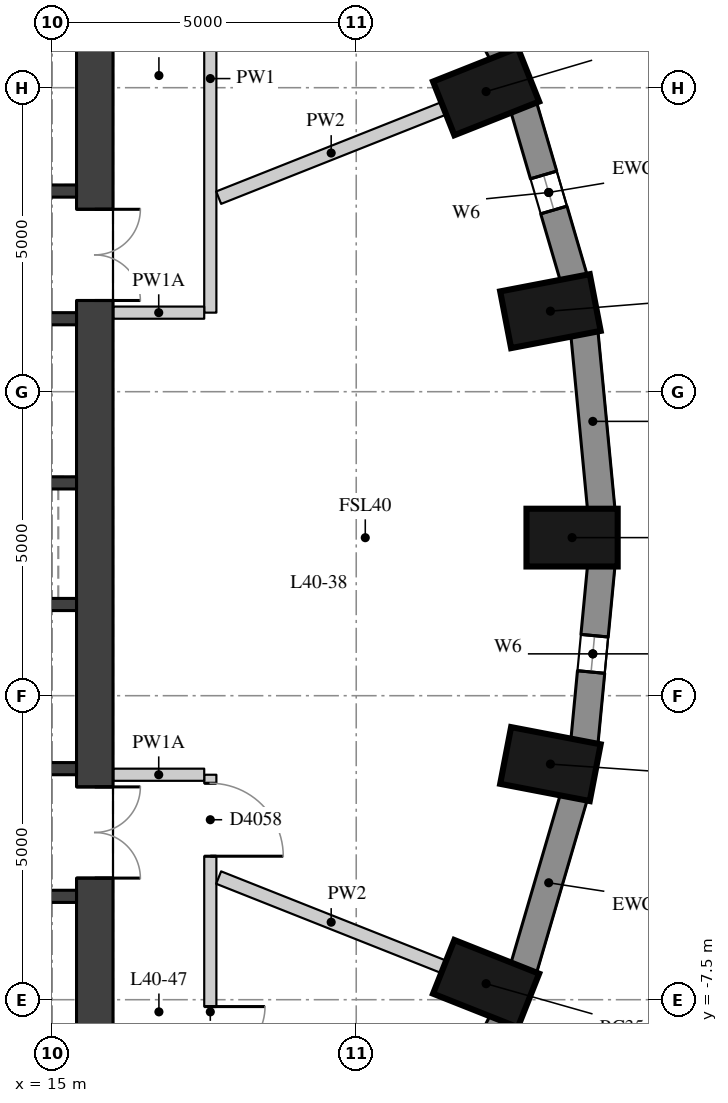
"""IFC4 building model, lengths in metres.
Left out: names, types, materials, properties, quantities, classifications, styles, units other than length and angle.
Written with IfcOpenShell. Run it as: python <this file> out.ifc"""

import sys

from ifc_helpers import new_model, si_unit, direction, frame, frame_2d, origin, origin_2d, place, context, subcontext, project, spatial, rectangle, extrude, element, fill, save


model = new_model("IFC4")
c1 = context("Model", 3, precision=1e-05, world=origin(), true_north=direction((0.0, 1.0)))
c2 = subcontext(c1, "Body", "Model", "MODEL_VIEW")
j1 = project(units=[si_unit("LENGTHUNIT", "METRE"), si_unit("PLANEANGLEUNIT", "RADIAN")], contexts=[c1])
p1 = place(None, origin())
s1 = spatial("IfcSite", under=j1, at=p1, CompositionType="ELEMENT")
p2 = place(p1, origin())
s2 = spatial("IfcBuilding", under=s1, at=p2, CompositionType="ELEMENT")
p3 = place(p2, frame((0.0, 0.0, 145.1)))
s3 = spatial("IfcBuildingStorey", under=s2, at=p3, CompositionType="ELEMENT", Elevation=145.1)
for number, where, z_axis, x_axis in (
    (1, (23.55, 0.1, 0.0), (0.0, 0.0, 1.0), (1.0, 0.0, 0.0)),
    (2, (23.194, 3.825, 0.0), (0.0, 0.0, 1.0), (0.982, 0.189, 0.0)),
    (3, (22.136, 7.436, 0.0), (0.0, 0.0, 1.0), (0.93, 0.369, 0.0)),
    (4, (22.136, -7.236, 0.0), (0.0, 0.0, 1.0), (0.93, -0.369, 0.0)),
    (5, (23.194, -3.625, 0.0), (0.0, 0.0, 1.0), (0.982, -0.189, 0.0)),
):
    element("IfcColumn", number, at=place(p3, frame(where, z_axis=z_axis, x_axis=x_axis)), inside=s3, PredefinedType="COLUMN", context=c2, shape_type="SweptSolid", body=[
        extrude(rectangle(XDim=1.5, YDim=0.95, at=origin_2d()), origin(), (0.0, 0.0, 1.0), 3.3),
    ])
p4 = place(p3, frame((24.031, 0.555, 0.0), z_axis=(0.0, 0.0, 1.0), x_axis=(-0.095265737322, 0.995451876935, 0.0)))
e6 = element("IfcWall", 6, at=p4, inside=s3, PredefinedType="SOLIDWALL", context=c2, shape_type="SweptSolid", body=[
    extrude(rectangle(XDim=2.927, YDim=0.45, at=frame_2d((1.463, 0.0))), origin(), (0.0, 0.0, 1.0), 3.02),
])
p5 = place(p3, frame((23.58, 4.362, 0.0), z_axis=(0.0, 0.0, 1.0), x_axis=(-0.281049481624, 0.959693278542, 0.0)))
e7 = element("IfcWall", 7, at=p5, inside=s3, PredefinedType="SOLIDWALL", context=c2, shape_type="SweptSolid", body=[
    extrude(rectangle(XDim=2.948, YDim=0.45, at=frame_2d((1.474, 0.0))), origin(), (0.0, 0.0, 1.0), 3.02),
])
p6 = place(p5, frame((1.174, 0.0, 0.4)))
e8 = element("IfcOpeningElement", 8, at=p6, cuts=e7, PredefinedType="OPENING", context=c2, shape_type="SweptSolid", body=[
    extrude(rectangle(XDim=0.6, YDim=1.75, at=frame_2d((0.3, 0.875))), frame((0.0, 0.235, 0.0), z_axis=(0.0, -1.0, 0.0), x_axis=(1.0, 0.0, 0.0)), (0.0, 0.0, 1.0), 0.47),
])
p7 = place(p3, frame((22.415, 8.037, 0.0), z_axis=(0.0, 0.0, 1.0), x_axis=(-0.454133999889, 0.890933392653, 0.0)))
e9 = element("IfcWall", 9, at=p7, inside=s3, PredefinedType="SOLIDWALL", context=c2, shape_type="SweptSolid", body=[
    extrude(rectangle(XDim=2.986, YDim=0.45, at=frame_2d((1.493, 0.0))), origin(), (0.0, 0.0, 1.0), 3.02),
])
p8 = place(p3, frame((21.059, -10.497, 0.0), z_axis=(0.0, 0.0, 1.0), x_axis=(0.454133999889, 0.890933392653, 0.0)))
e10 = element("IfcWall", 10, at=p8, inside=s3, PredefinedType="SOLIDWALL", context=c2, shape_type="SweptSolid", body=[
    extrude(rectangle(XDim=2.986, YDim=0.45, at=frame_2d((1.493, 0.0))), origin(), (0.0, 0.0, 1.0), 3.02),
])
p9 = place(p8, frame((1.193, 0.0, 0.4)))
e11 = element("IfcOpeningElement", 11, at=p9, cuts=e10, PredefinedType="OPENING", context=c2, shape_type="SweptSolid", body=[
    extrude(rectangle(XDim=0.6, YDim=1.75, at=frame_2d((0.3, 0.875))), frame((0.0, 0.235, 0.0), z_axis=(0.0, -1.0, 0.0), x_axis=(1.0, 0.0, 0.0)), (0.0, 0.0, 1.0), 0.47),
])
p10 = place(p3, frame((22.751, -6.991, 0.0), z_axis=(0.0, 0.0, 1.0), x_axis=(0.281049481624, 0.959693278542, 0.0)))
e12 = element("IfcWall", 12, at=p10, inside=s3, PredefinedType="SOLIDWALL", context=c2, shape_type="SweptSolid", body=[
    extrude(rectangle(XDim=2.948, YDim=0.45, at=frame_2d((1.474, 0.0))), origin(), (0.0, 0.0, 1.0), 3.02),
])
p11 = place(p3, frame((23.752, -3.269, 0.0), z_axis=(0.0, 0.0, 1.0), x_axis=(0.095257827044, 0.995452633924, 0.0)))
e13 = element("IfcWall", 13, at=p11, inside=s3, PredefinedType="SOLIDWALL", context=c2, shape_type="SweptSolid", body=[
    extrude(rectangle(XDim=2.927, YDim=0.45, at=frame_2d((1.463, 0.0))), origin(), (0.0, 0.0, 1.0), 3.02),
])
p12 = place(p11, frame((1.163, 0.0, 0.4)))
e14 = element("IfcOpeningElement", 14, at=p12, cuts=e13, PredefinedType="OPENING", context=c2, shape_type="SweptSolid", body=[
    extrude(rectangle(XDim=0.6, YDim=1.75, at=frame_2d((0.3, 0.875))), frame((0.0, 0.235, 0.0), z_axis=(0.0, -1.0, 0.0), x_axis=(1.0, 0.0, 0.0)), (0.0, 0.0, 1.0), 0.47),
])
p13 = place(p3, frame((15.7, -9.4, 0.0), z_axis=(0.0, 0.0, 1.0), x_axis=(0.0, 1.0, 0.0)))
e15 = element("IfcWall", 15, at=p13, inside=s3, PredefinedType="SHEAR", context=c2, shape_type="SweptSolid", body=[
    extrude(rectangle(XDim=18.8, YDim=0.6, at=frame_2d((9.4, 0.0))), origin(), (0.0, 0.0, 1.0), 3.02),
])
p14 = place(p13, frame((13.4, 0.0, 0.0)))
e16 = element("IfcOpeningElement", 16, at=p14, cuts=e15, PredefinedType="OPENING", context=c2, shape_type="SweptSolid", body=[
    extrude(rectangle(XDim=1.5, YDim=2.1, at=frame_2d((0.75, 1.05))), frame((0.0, 0.31, 0.0), z_axis=(0.0, -1.0, 0.0), x_axis=(1.0, 0.0, 0.0)), (0.0, 0.0, 1.0), 0.62),
])
p15 = place(p13, frame((3.9, 0.0, 0.0)))
e17 = element("IfcOpeningElement", 17, at=p15, cuts=e15, PredefinedType="OPENING", context=c2, shape_type="SweptSolid", body=[
    extrude(rectangle(XDim=1.5, YDim=2.1, at=frame_2d((0.75, 1.05))), frame((0.0, 0.31, 0.0), z_axis=(0.0, -1.0, 0.0), x_axis=(1.0, 0.0, 0.0)), (0.0, 0.0, 1.0), 0.62),
])
p16 = place(p3, frame((4.6, 5.8, 0.0), z_axis=(0.0, 0.0, 1.0), x_axis=(1.0, 0.0, 0.0)))
e18 = element("IfcWall", 18, at=p16, inside=s3, PredefinedType="SHEAR", context=c2, shape_type="SweptSolid", body=[
    extrude(rectangle(XDim=10.8, YDim=0.2, at=frame_2d((5.4, 0.0))), origin(), (0.0, 0.0, 1.0), 3.02),
])
p17 = place(p16, frame((7.05, 0.0, 0.0)))
e19 = element("IfcOpeningElement", 19, at=p17, cuts=e18, PredefinedType="OPENING", context=c2, shape_type="SweptSolid", body=[
    extrude(rectangle(XDim=1.1, YDim=2.1, at=frame_2d((0.55, 1.05))), frame((0.0, 0.11, 0.0), z_axis=(0.0, -1.0, 0.0), x_axis=(1.0, 0.0, 0.0)), (0.0, 0.0, 1.0), 0.22),
])
p18 = place(p16, frame((9.05, 0.0, 0.0)))
e20 = element("IfcOpeningElement", 20, at=p18, cuts=e18, PredefinedType="OPENING", context=c2, shape_type="SweptSolid", body=[
    extrude(rectangle(XDim=1.1, YDim=2.1, at=frame_2d((0.55, 1.05))), frame((0.0, 0.11, 0.0), z_axis=(0.0, -1.0, 0.0), x_axis=(1.0, 0.0, 0.0)), (0.0, 0.0, 1.0), 0.22),
])
p19 = place(p3, frame((4.6, 3.7, 0.0), z_axis=(0.0, 0.0, 1.0), x_axis=(1.0, 0.0, 0.0)))
e21 = element("IfcWall", 21, at=p19, inside=s3, PredefinedType="SHEAR", context=c2, shape_type="SweptSolid", body=[
    extrude(rectangle(XDim=10.8, YDim=0.2, at=frame_2d((5.4, 0.0))), origin(), (0.0, 0.0, 1.0), 3.02),
])
p20 = place(p19, frame((6.6, 0.0, 0.0)))
e22 = element("IfcOpeningElement", 22, at=p20, cuts=e21, PredefinedType="OPENING", context=c2, shape_type="SweptSolid", body=[
    extrude(rectangle(XDim=1.1, YDim=2.1, at=frame_2d((0.55, 1.05))), frame((0.0, 0.11, 0.0), z_axis=(0.0, -1.0, 0.0), x_axis=(1.0, 0.0, 0.0)), (0.0, 0.0, 1.0), 0.22),
])
p21 = place(p19, frame((8.9, 0.0, 0.0)))
e23 = element("IfcOpeningElement", 23, at=p21, cuts=e21, PredefinedType="OPENING", context=c2, shape_type="SweptSolid", body=[
    extrude(rectangle(XDim=1.1, YDim=2.1, at=frame_2d((0.55, 1.05))), frame((0.0, 0.11, 0.0), z_axis=(0.0, -1.0, 0.0), x_axis=(1.0, 0.0, 0.0)), (0.0, 0.0, 1.0), 0.22),
])
for number, where, z_axis, x_axis in (
    (24, (4.6, 1.0, 0.0), (0.0, 0.0, 1.0), (1.0, 0.0, 0.0)),
    (25, (4.6, -1.0, 0.0), (0.0, 0.0, 1.0), (1.0, 0.0, 0.0)),
):
    element("IfcWall", number, at=place(p3, frame(where, z_axis=z_axis, x_axis=x_axis)), inside=s3, PredefinedType="SHEAR", context=c2, shape_type="SweptSolid", body=[
        extrude(rectangle(XDim=10.8, YDim=0.2, at=frame_2d((5.4, 0.0))), origin(), (0.0, 0.0, 1.0), 3.02),
    ])
p22 = place(p3, frame((4.6, -3.7, 0.0), z_axis=(0.0, 0.0, 1.0), x_axis=(1.0, 0.0, 0.0)))
e26 = element("IfcWall", 26, at=p22, inside=s3, PredefinedType="SHEAR", context=c2, shape_type="SweptSolid", body=[
    extrude(rectangle(XDim=10.8, YDim=0.2, at=frame_2d((5.4, 0.0))), origin(), (0.0, 0.0, 1.0), 3.02),
])
p23 = place(p22, frame((6.6, 0.0, 0.0)))
e27 = element("IfcOpeningElement", 27, at=p23, cuts=e26, PredefinedType="OPENING", context=c2, shape_type="SweptSolid", body=[
    extrude(rectangle(XDim=1.1, YDim=2.1, at=frame_2d((0.55, 1.05))), frame((0.0, 0.11, 0.0), z_axis=(0.0, -1.0, 0.0), x_axis=(1.0, 0.0, 0.0)), (0.0, 0.0, 1.0), 0.22),
])
p24 = place(p22, frame((8.9, 0.0, 0.0)))
e28 = element("IfcOpeningElement", 28, at=p24, cuts=e26, PredefinedType="OPENING", context=c2, shape_type="SweptSolid", body=[
    extrude(rectangle(XDim=1.1, YDim=2.1, at=frame_2d((0.55, 1.05))), frame((0.0, 0.11, 0.0), z_axis=(0.0, -1.0, 0.0), x_axis=(1.0, 0.0, 0.0)), (0.0, 0.0, 1.0), 0.22),
])
p25 = place(p3, frame((4.6, -5.8, 0.0), z_axis=(0.0, 0.0, 1.0), x_axis=(1.0, 0.0, 0.0)))
e29 = element("IfcWall", 29, at=p25, inside=s3, PredefinedType="SHEAR", context=c2, shape_type="SweptSolid", body=[
    extrude(rectangle(XDim=10.8, YDim=0.2, at=frame_2d((5.4, 0.0))), origin(), (0.0, 0.0, 1.0), 3.02),
])
p26 = place(p3, frame((17.6, -3.8, 0.0), z_axis=(0.0, 0.0, 1.0), x_axis=(0.0, -1.0, 0.0)))
e30 = element("IfcWall", 30, at=p26, inside=s3, PredefinedType="PARTITIONING", context=c2, shape_type="SweptSolid", body=[
    extrude(rectangle(XDim=7.8, YDim=0.2, at=frame_2d((3.9, 0.0))), origin(), (0.0, 0.0, 1.0), 3.02),
])
p27 = place(p26, frame((3.813, 0.0, 0.0)))
e31 = element("IfcOpeningElement", 31, at=p27, cuts=e30, PredefinedType="OPENING", context=c2, shape_type="SweptSolid", body=[
    extrude(rectangle(XDim=1.8, YDim=2.1, at=frame_2d((0.9, 1.05))), frame((0.0, 0.11, 0.0), z_axis=(0.0, -1.0, 0.0), x_axis=(1.0, 0.0, 0.0)), (0.0, 0.0, 1.0), 0.22),
])
p28 = place(p26, frame((0.14, 0.0, 0.0)))
e32 = element("IfcOpeningElement", 32, at=p28, cuts=e30, PredefinedType="OPENING", context=c2, shape_type="SweptSolid", body=[
    extrude(rectangle(XDim=1.2, YDim=2.1, at=frame_2d((0.6, 1.05))), frame((0.0, 0.11, 0.0), z_axis=(0.0, -1.0, 0.0), x_axis=(1.0, 0.0, 0.0)), (0.0, 0.0, 1.0), 0.22),
])
p29 = place(p3, frame((17.6, 11.5, 0.0), z_axis=(0.0, 0.0, 1.0), x_axis=(0.0, -1.0, 0.0)))
e33 = element("IfcWall", 33, at=p29, inside=s3, PredefinedType="PARTITIONING", context=c2, shape_type="SweptSolid", body=[
    extrude(rectangle(XDim=7.7, YDim=0.2, at=frame_2d((3.85, 0.0))), origin(), (0.0, 0.0, 1.0), 3.02),
])
for number, where, z_axis, x_axis in (
    (34, (17.5, 3.8, 0.0), (0.0, 0.0, 1.0), (-1.0, 0.0, 0.0)),
    (35, (16.004, -3.8, 0.0), (0.0, 0.0, 1.0), (1.0, 0.0, 0.0)),
):
    element("IfcWall", number, at=place(p3, frame(where, z_axis=z_axis, x_axis=x_axis)), inside=s3, PredefinedType="PARTITIONING", context=c2, shape_type="SweptSolid", body=[
        extrude(rectangle(XDim=1.496, YDim=0.2, at=frame_2d((0.748, 0.0))), origin(), (0.0, 0.0, 1.0), 2.57),
    ])
for number, where, z_axis, x_axis in (
    (36, (21.439, 7.16, 0.0), (0.0, 0.0, 1.0), (-0.93, -0.369, 0.0)),
    (37, (21.439, -6.96, 0.0), (0.0, 0.0, 1.0), (-0.93, 0.369, 0.0)),
):
    element("IfcWall", number, at=place(p3, frame(where, z_axis=z_axis, x_axis=x_axis)), inside=s3, PredefinedType="PARTITIONING", context=c2, shape_type="SweptSolid", body=[
        extrude(rectangle(XDim=3.982, YDim=0.22, at=frame_2d((1.991, 0.0))), origin(), (0.0, 0.0, 1.0), 3.02),
    ])
p30 = place(p6, origin())
e38 = element("IfcWindow", 38, at=p30, inside=s3, PartitioningType="SINGLE_PANEL", PredefinedType="WINDOW", context=c2, shape_type="SweptSolid", body=[
    extrude(rectangle(XDim=0.6, YDim=1.75, at=frame_2d((0.3, 0.875))), frame((0.0, 0.035, 0.0), z_axis=(0.0, -1.0, 0.0), x_axis=(1.0, 0.0, 0.0)), (0.0, 0.0, 1.0), 0.06),
])
fill(e8, e38)
p31 = place(p12, origin())
e39 = element("IfcWindow", 39, at=p31, inside=s3, PartitioningType="SINGLE_PANEL", PredefinedType="WINDOW", context=c2, shape_type="SweptSolid", body=[
    extrude(rectangle(XDim=0.6, YDim=1.75, at=frame_2d((0.3, 0.875))), frame((0.0, 0.035, 0.0), z_axis=(0.0, -1.0, 0.0), x_axis=(1.0, 0.0, 0.0)), (0.0, 0.0, 1.0), 0.06),
])
fill(e14, e39)
p32 = place(p14, origin())
e40 = element("IfcDoor", 40, at=p32, inside=s3, OperationType="DOUBLE_DOOR_SINGLE_SWING", PredefinedType="DOOR", context=c2, shape_type="SweptSolid", body=[
    extrude(rectangle(XDim=1.5, YDim=2.1, at=frame_2d((0.75, 1.05))), frame((0.0, 0.025, 0.0), z_axis=(0.0, -1.0, 0.0), x_axis=(1.0, 0.0, 0.0)), (0.0, 0.0, 1.0), 0.05),
])
fill(e16, e40)
p33 = place(p15, origin())
e41 = element("IfcDoor", 41, at=p33, inside=s3, OperationType="DOUBLE_DOOR_SINGLE_SWING", PredefinedType="DOOR", context=c2, shape_type="SweptSolid", body=[
    extrude(rectangle(XDim=1.5, YDim=2.1, at=frame_2d((0.75, 1.05))), frame((0.0, 0.025, 0.0), z_axis=(0.0, -1.0, 0.0), x_axis=(1.0, 0.0, 0.0)), (0.0, 0.0, 1.0), 0.05),
])
fill(e17, e41)
p34 = place(p27, origin())
e42 = element("IfcDoor", 42, at=p34, inside=s3, OperationType="DOUBLE_DOOR_SINGLE_SWING", PredefinedType="DOOR", context=c2, shape_type="SweptSolid", body=[
    extrude(rectangle(XDim=1.8, YDim=2.1, at=frame_2d((0.9, 1.05))), frame((0.0, 0.025, 0.0), z_axis=(0.0, -1.0, 0.0), x_axis=(1.0, 0.0, 0.0)), (0.0, 0.0, 1.0), 0.05),
])
fill(e31, e42)
p35 = place(p28, origin())
e43 = element("IfcDoor", 43, at=p35, inside=s3, OperationType="SINGLE_SWING_RIGHT", PredefinedType="DOOR", context=c2, shape_type="SweptSolid", body=[
    extrude(rectangle(XDim=1.2, YDim=2.1, at=frame_2d((0.6, 1.05))), frame((0.0, 0.025, 0.0), z_axis=(0.0, -1.0, 0.0), x_axis=(1.0, 0.0, 0.0)), (0.0, 0.0, 1.0), 0.05),
])
fill(e32, e43)
save(model, sys.argv[1])
